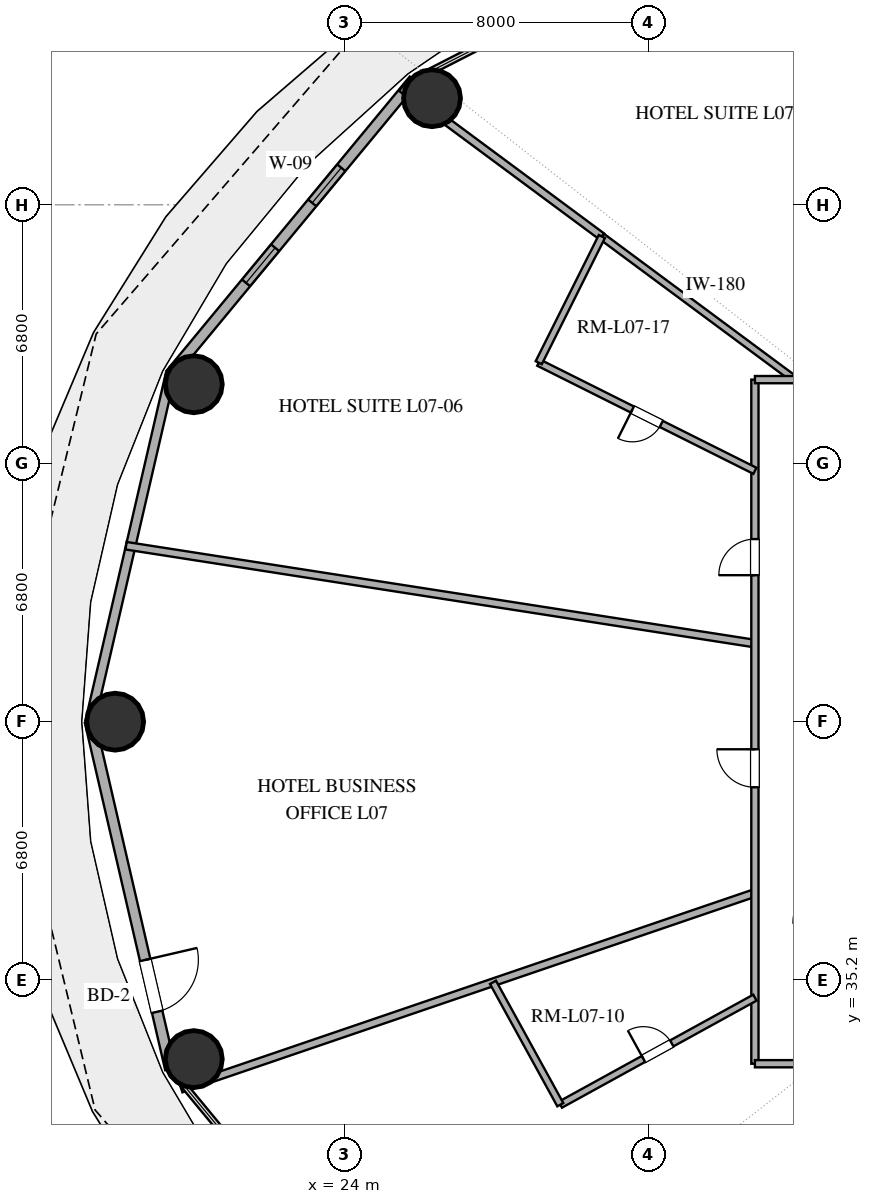
"""IFC4 building model, lengths in metres.
Left out: names, types, materials, properties, quantities, classifications, styles, units other than length and angle.
Written with IfcOpenShell. Run it as: python <this file> out.ifc"""

import sys

from ifc_helpers import new_model, si_unit, direction, frame, frame_2d, origin, origin_2d, place, context, subcontext, project, spatial, rectangle, hollow_circle, extrude, element, fill, save


model = new_model("IFC4")
c1 = context("Model", 3, precision=1e-05, world=origin(), true_north=direction((0.0, 1.0)))
c2 = subcontext(c1, "Body", "Model", "MODEL_VIEW")
j1 = project(units=[si_unit("LENGTHUNIT", "METRE"), si_unit("PLANEANGLEUNIT", "RADIAN")], contexts=[c1])
p1 = place(None, origin())
s1 = spatial("IfcSite", under=j1, at=p1, CompositionType="ELEMENT")
p2 = place(p1, origin())
s2 = spatial("IfcBuilding", under=s1, at=p2, CompositionType="ELEMENT")
p3 = place(p2, frame((0.0, 0.0, 35.4)))
s3 = spatial("IfcBuildingStorey", under=s2, at=p3, CompositionType="ELEMENT", Elevation=35.4)
for number, where, z_axis, x_axis in (
    (1, (26.303, 58.405, 0.0), (0.0, 0.0, 1.0), (1.0, 0.0, 0.0)),
    (2, (20.034, 50.878, 0.0), (0.0, 0.0, 1.0), (1.0, 0.0, 0.0)),
    (3, (17.965, 42.0, 0.0), (0.0, 0.0, 1.0), (1.0, 0.0, 0.0)),
    (4, (20.034, 33.122, 0.0), (0.0, 0.0, 1.0), (1.0, 0.0, 0.0)),
):
    element("IfcColumn", number, at=place(p3, frame(where, z_axis=z_axis, x_axis=x_axis)), inside=s3, PredefinedType="COLUMN", context=c2, shape_type="SweptSolid", body=[
        extrude(hollow_circle(Radius=0.75, WallThickness=0.04, at=origin_2d()), origin(), (0.0, 0.0, 1.0), 3.38),
    ])
p4 = place(p3, frame((25.826, 58.886, 0.0), z_axis=(0.0, 0.0, 1.0), x_axis=(-0.637296809613, -0.770618437657, 0.0)))
e5 = element("IfcWall", 5, at=p4, inside=s3, PredefinedType="SOLIDWALL", context=c2, shape_type="SweptSolid", body=[
    extrude(rectangle(XDim=10.053, YDim=0.28, at=frame_2d((5.027, 0.0))), origin(), (0.0, 0.0, 1.0), 3.38),
])
p5 = place(p4, frame((2.998, 0.0, 0.85)))
e6 = element("IfcOpeningElement", 6, at=p5, cuts=e5, PredefinedType="OPENING", context=c2, shape_type="SweptSolid", body=[
    extrude(rectangle(XDim=1.2, YDim=1.8, at=frame_2d((0.6, 0.9))), frame((0.0, 0.15, 0.0), z_axis=(0.0, -1.0, 0.0), x_axis=(1.0, 0.0, 0.0)), (0.0, 0.0, 1.0), 0.3),
])
p6 = place(p4, frame((5.73, 0.0, 0.85)))
e7 = element("IfcOpeningElement", 7, at=p6, cuts=e5, PredefinedType="OPENING", context=c2, shape_type="SweptSolid", body=[
    extrude(rectangle(XDim=1.2, YDim=1.8, at=frame_2d((0.6, 0.9))), frame((0.0, 0.15, 0.0), z_axis=(0.0, -1.0, 0.0), x_axis=(1.0, 0.0, 0.0)), (0.0, 0.0, 1.0), 0.3),
])
p7 = place(p3, frame((19.419, 51.138, 0.0), z_axis=(0.0, 0.0, 1.0), x_axis=(-0.225454452941, -0.974253709076, 0.0)))
e8 = element("IfcWall", 8, at=p7, inside=s3, PredefinedType="SOLIDWALL", context=c2, shape_type="SweptSolid", body=[
    extrude(rectangle(XDim=9.38, YDim=0.25, at=frame_2d((4.69, 0.0))), origin(), (0.0, 0.0, 1.0), 3.38),
])
p8 = place(p3, frame((17.304, 42.0, 0.0), z_axis=(0.0, 0.0, 1.0), x_axis=(0.225454452941, -0.974253709076, 0.0)))
e9 = element("IfcWall", 9, at=p8, inside=s3, PredefinedType="SOLIDWALL", context=c2, shape_type="SweptSolid", body=[
    extrude(rectangle(XDim=9.38, YDim=0.28, at=frame_2d((4.69, 0.0))), origin(), (0.0, 0.0, 1.0), 3.38),
])
p9 = place(p8, frame((6.435, 0.0, 0.0)))
e10 = element("IfcOpeningElement", 10, at=p9, cuts=e9, PredefinedType="OPENING", context=c2, shape_type="SweptSolid", body=[
    extrude(rectangle(XDim=1.4, YDim=2.2, at=frame_2d((0.7, 1.1))), frame((0.0, 0.15, 0.0), z_axis=(0.0, -1.0, 0.0), x_axis=(1.0, 0.0, 0.0)), (0.0, 0.0, 1.0), 0.3),
])
p10 = place(p3, frame((18.253, 46.63, 0.0), z_axis=(0.0, 0.0, 1.0), x_axis=(0.988105936892, -0.153774697134, 0.0)))
e11 = element("IfcWall", 11, at=p10, inside=s3, PredefinedType="PARTITIONING", context=c2, shape_type="SweptSolid", body=[
    extrude(rectangle(XDim=16.747, YDim=0.2, at=frame_2d((8.373, 0.0))), origin(), (0.0, 0.0, 1.0), 2.74),
])
p11 = place(p3, frame((34.8, 37.494, 0.0), z_axis=(0.0, 0.0, 1.0), x_axis=(-0.946390715793, -0.32302416792, 0.0)))
e12 = element("IfcWall", 12, at=p11, inside=s3, PredefinedType="PARTITIONING", context=c2, shape_type="SweptSolid", body=[
    extrude(rectangle(XDim=15.952, YDim=0.2, at=frame_2d((7.976, 0.0))), origin(), (0.0, 0.0, 1.0), 2.74),
])
p12 = place(p3, frame((34.8, 33.0, 0.0), z_axis=(0.0, 0.0, 1.0), x_axis=(0.0, 1.0, 0.0)))
e13 = element("IfcWall", 13, at=p12, inside=s3, PredefinedType="PARTITIONING", context=c2, shape_type="SweptSolid", body=[
    extrude(rectangle(XDim=18.0, YDim=0.19, at=frame_2d((9.0, 0.0))), origin(), (0.0, 0.0, 1.0), 2.74),
])
p13 = place(p12, frame((7.274, 0.0, 0.0)))
e14 = element("IfcOpeningElement", 14, at=p13, cuts=e13, PredefinedType="OPENING", context=c2, shape_type="SweptSolid", body=[
    extrude(rectangle(XDim=1.0, YDim=2.2, at=frame_2d((0.5, 1.1))), frame((0.0, 0.105, 0.0), z_axis=(0.0, -1.0, 0.0), x_axis=(1.0, 0.0, 0.0)), (0.0, 0.0, 1.0), 0.21),
])
p14 = place(p12, frame((12.854, 0.0, 0.0)))
e15 = element("IfcOpeningElement", 15, at=p14, cuts=e13, PredefinedType="OPENING", context=c2, shape_type="SweptSolid", body=[
    extrude(rectangle(XDim=0.95, YDim=2.15, at=frame_2d((0.475, 1.075))), frame((0.0, 0.105, 0.0), z_axis=(0.0, -1.0, 0.0), x_axis=(1.0, 0.0, 0.0)), (0.0, 0.0, 1.0), 0.21),
])
p15 = place(p3, frame((25.496, 58.675, 0.0), z_axis=(0.0, 0.0, 1.0), x_axis=(0.803457728354, -0.595361804912, 0.0)))
e16 = element("IfcWall", 16, at=p15, inside=s3, PredefinedType="PARTITIONING", context=c2, shape_type="SweptSolid", body=[
    extrude(rectangle(XDim=6.566, YDim=0.2, at=frame_2d((3.283, 0.0))), origin(), (0.0, 0.0, 1.0), 2.74),
])
p16 = place(p3, frame((34.8, 48.601, 0.0), z_axis=(0.0, 0.0, 1.0), x_axis=(-0.894404156958, 0.447259660617, 0.0)))
e17 = element("IfcWall", 17, at=p16, inside=s3, PredefinedType="PLUMBINGWALL", context=c2, shape_type="SweptSolid", body=[
    extrude(rectangle(XDim=6.36, YDim=0.18, at=frame_2d((3.18, 0.0))), origin(), (0.0, 0.0, 1.0), 2.74),
])
p17 = place(p16, frame((2.755, 0.0, 0.0)))
e18 = element("IfcOpeningElement", 18, at=p17, cuts=e17, PredefinedType="OPENING", context=c2, shape_type="SweptSolid", body=[
    extrude(rectangle(XDim=0.85, YDim=2.1, at=frame_2d((0.425, 1.05))), frame((0.0, 0.1, 0.0), z_axis=(0.0, -1.0, 0.0), x_axis=(1.0, 0.0, 0.0)), (0.0, 0.0, 1.0), 0.2),
])
p18 = place(p3, frame((30.772, 54.766, 0.0), z_axis=(0.0, 0.0, 1.0), x_axis=(0.803451199128, -0.595370616187, 0.0)))
e19 = element("IfcWall", 19, at=p18, inside=s3, PredefinedType="PLUMBINGWALL", context=c2, shape_type="SweptSolid", body=[
    extrude(rectangle(XDim=6.325, YDim=0.18, at=frame_2d((3.163, 0.0))), origin(), (0.0, 0.0, 1.0), 2.74),
])
p19 = place(p3, frame((29.679, 31.922, 0.0), z_axis=(0.0, 0.0, 1.0), x_axis=(0.876185038284, 0.481974873503, 0.0)))
e20 = element("IfcWall", 20, at=p19, inside=s3, PredefinedType="PLUMBINGWALL", context=c2, shape_type="SweptSolid", body=[
    extrude(rectangle(XDim=5.844, YDim=0.18, at=frame_2d((2.922, 0.0))), origin(), (0.0, 0.0, 1.0), 2.74),
])
p20 = place(p19, frame((2.497, 0.0, 0.0)))
e21 = element("IfcOpeningElement", 21, at=p20, cuts=e20, PredefinedType="OPENING", context=c2, shape_type="SweptSolid", body=[
    extrude(rectangle(XDim=0.85, YDim=2.1, at=frame_2d((0.425, 1.05))), frame((0.0, 0.1, 0.0), z_axis=(0.0, -1.0, 0.0), x_axis=(1.0, 0.0, 0.0)), (0.0, 0.0, 1.0), 0.2),
])
p21 = place(p3, frame((34.8, 51.0, 0.0), z_axis=(0.0, 0.0, 1.0), x_axis=(1.0, 0.0, 0.0)))
e22 = element("IfcWall", 22, at=p21, inside=s3, PredefinedType="PARTITIONING", context=c2, shape_type="SweptSolid", body=[
    extrude(rectangle(XDim=8.891, YDim=0.19, at=frame_2d((4.445, 0.0))), origin(), (0.0, 0.0, 1.0), 2.74),
])
p22 = place(p21, frame((3.407, 0.0, 0.0)))
e23 = element("IfcOpeningElement", 23, at=p22, cuts=e22, PredefinedType="OPENING", context=c2, shape_type="SweptSolid", body=[
    extrude(rectangle(XDim=0.95, YDim=2.15, at=frame_2d((0.475, 1.075))), frame((0.0, 0.105, 0.0), z_axis=(0.0, -1.0, 0.0), x_axis=(1.0, 0.0, 0.0)), (0.0, 0.0, 1.0), 0.21),
])
p23 = place(p3, frame((35.64, 28.958, 0.0), z_axis=(0.0, 0.0, 1.0), x_axis=(0.687867465085, 0.725836311077, 0.0)))
e24 = element("IfcWall", 24, at=p23, inside=s3, PredefinedType="PLUMBINGWALL", context=c2, shape_type="SweptSolid", body=[
    extrude(rectangle(XDim=5.568, YDim=0.18, at=frame_2d((2.784, 0.0))), origin(), (0.0, 0.0, 1.0), 2.74),
])
p24 = place(p3, frame((42.083, 33.0, 0.0), z_axis=(0.0, 0.0, 1.0), x_axis=(-1.0, 0.0, 0.0)))
e25 = element("IfcWall", 25, at=p24, inside=s3, PredefinedType="PARTITIONING", context=c2, shape_type="SweptSolid", body=[
    extrude(rectangle(XDim=7.283, YDim=0.19, at=frame_2d((3.642, 0.0))), origin(), (0.0, 0.0, 1.0), 2.74),
])
p25 = place(p24, frame((4.451, 0.0, 0.0)))
e26 = element("IfcOpeningElement", 26, at=p25, cuts=e25, PredefinedType="OPENING", context=c2, shape_type="SweptSolid", body=[
    extrude(rectangle(XDim=0.95, YDim=2.15, at=frame_2d((0.475, 1.075))), frame((0.0, 0.105, 0.0), z_axis=(0.0, -1.0, 0.0), x_axis=(1.0, 0.0, 0.0)), (0.0, 0.0, 1.0), 0.21),
])
p26 = place(p3, frame((29.112, 51.446, 0.0), z_axis=(0.0, 0.0, 1.0), x_axis=(0.447292516126, 0.894387726334, 0.0)))
e27 = element("IfcWall", 27, at=p26, inside=s3, PredefinedType="PLUMBINGWALL", context=c2, shape_type="SweptSolid", body=[
    extrude(rectangle(XDim=3.712, YDim=0.18, at=frame_2d((1.856, 0.0))), origin(), (0.0, 0.0, 1.0), 2.74),
])
p27 = place(p3, frame((27.908, 35.142, 0.0), z_axis=(0.0, 0.0, 1.0), x_axis=(0.481967195945, -0.876189261537, 0.0)))
e28 = element("IfcWall", 28, at=p27, inside=s3, PredefinedType="PLUMBINGWALL", context=c2, shape_type="SweptSolid", body=[
    extrude(rectangle(XDim=3.676, YDim=0.18, at=frame_2d((1.838, 0.0))), origin(), (0.0, 0.0, 1.0), 2.74),
])
p28 = place(p5, origin())
e29 = element("IfcWindow", 29, at=p28, inside=s3, PartitioningType="SINGLE_PANEL", PredefinedType="WINDOW", context=c2, shape_type="SweptSolid", body=[
    extrude(rectangle(XDim=1.2, YDim=1.8, at=frame_2d((0.6, 0.9))), frame((0.0, 0.03, 0.0), z_axis=(0.0, -1.0, 0.0), x_axis=(1.0, 0.0, 0.0)), (0.0, 0.0, 1.0), 0.06),
])
fill(e6, e29)
p29 = place(p6, origin())
e30 = element("IfcWindow", 30, at=p29, inside=s3, PartitioningType="SINGLE_PANEL", PredefinedType="WINDOW", context=c2, shape_type="SweptSolid", body=[
    extrude(rectangle(XDim=1.2, YDim=1.8, at=frame_2d((0.6, 0.9))), frame((0.0, 0.03, 0.0), z_axis=(0.0, -1.0, 0.0), x_axis=(1.0, 0.0, 0.0)), (0.0, 0.0, 1.0), 0.06),
])
fill(e7, e30)
p30 = place(p9, origin())
e31 = element("IfcDoor", 31, at=p30, inside=s3, OperationType="SINGLE_SWING_LEFT", PredefinedType="DOOR", context=c2, shape_type="SweptSolid", body=[
    extrude(rectangle(XDim=1.4, YDim=2.2, at=frame_2d((0.7, 1.1))), frame((0.0, 0.025, 0.0), z_axis=(0.0, -1.0, 0.0), x_axis=(1.0, 0.0, 0.0)), (0.0, 0.0, 1.0), 0.05),
])
fill(e10, e31)
p31 = place(p13, origin())
e32 = element("IfcDoor", 32, at=p31, inside=s3, OperationType="SINGLE_SWING_RIGHT", PredefinedType="DOOR", context=c2, shape_type="SweptSolid", body=[
    extrude(rectangle(XDim=1.0, YDim=2.2, at=frame_2d((0.5, 1.1))), frame((0.0, 0.025, 0.0), z_axis=(0.0, -1.0, 0.0), x_axis=(1.0, 0.0, 0.0)), (0.0, 0.0, 1.0), 0.05),
])
fill(e14, e32)
p32 = place(p14, origin())
e33 = element("IfcDoor", 33, at=p32, inside=s3, OperationType="SINGLE_SWING_LEFT", PredefinedType="DOOR", context=c2, shape_type="SweptSolid", body=[
    extrude(rectangle(XDim=0.95, YDim=2.15, at=frame_2d((0.475, 1.075))), frame((0.0, 0.025, 0.0), z_axis=(0.0, -1.0, 0.0), x_axis=(1.0, 0.0, 0.0)), (0.0, 0.0, 1.0), 0.05),
])
fill(e15, e33)
p33 = place(p17, origin())
e34 = element("IfcDoor", 34, at=p33, inside=s3, OperationType="SINGLE_SWING_RIGHT", PredefinedType="DOOR", context=c2, shape_type="SweptSolid", body=[
    extrude(rectangle(XDim=0.85, YDim=2.1, at=frame_2d((0.425, 1.05))), frame((0.0, 0.025, 0.0), z_axis=(0.0, -1.0, 0.0), x_axis=(1.0, 0.0, 0.0)), (0.0, 0.0, 1.0), 0.05),
])
fill(e18, e34)
p34 = place(p20, origin())
e35 = element("IfcDoor", 35, at=p34, inside=s3, OperationType="SINGLE_SWING_LEFT", PredefinedType="DOOR", context=c2, shape_type="SweptSolid", body=[
    extrude(rectangle(XDim=0.85, YDim=2.1, at=frame_2d((0.425, 1.05))), frame((0.0, 0.025, 0.0), z_axis=(0.0, -1.0, 0.0), x_axis=(1.0, 0.0, 0.0)), (0.0, 0.0, 1.0), 0.05),
])
fill(e21, e35)
save(model, sys.argv[1])
